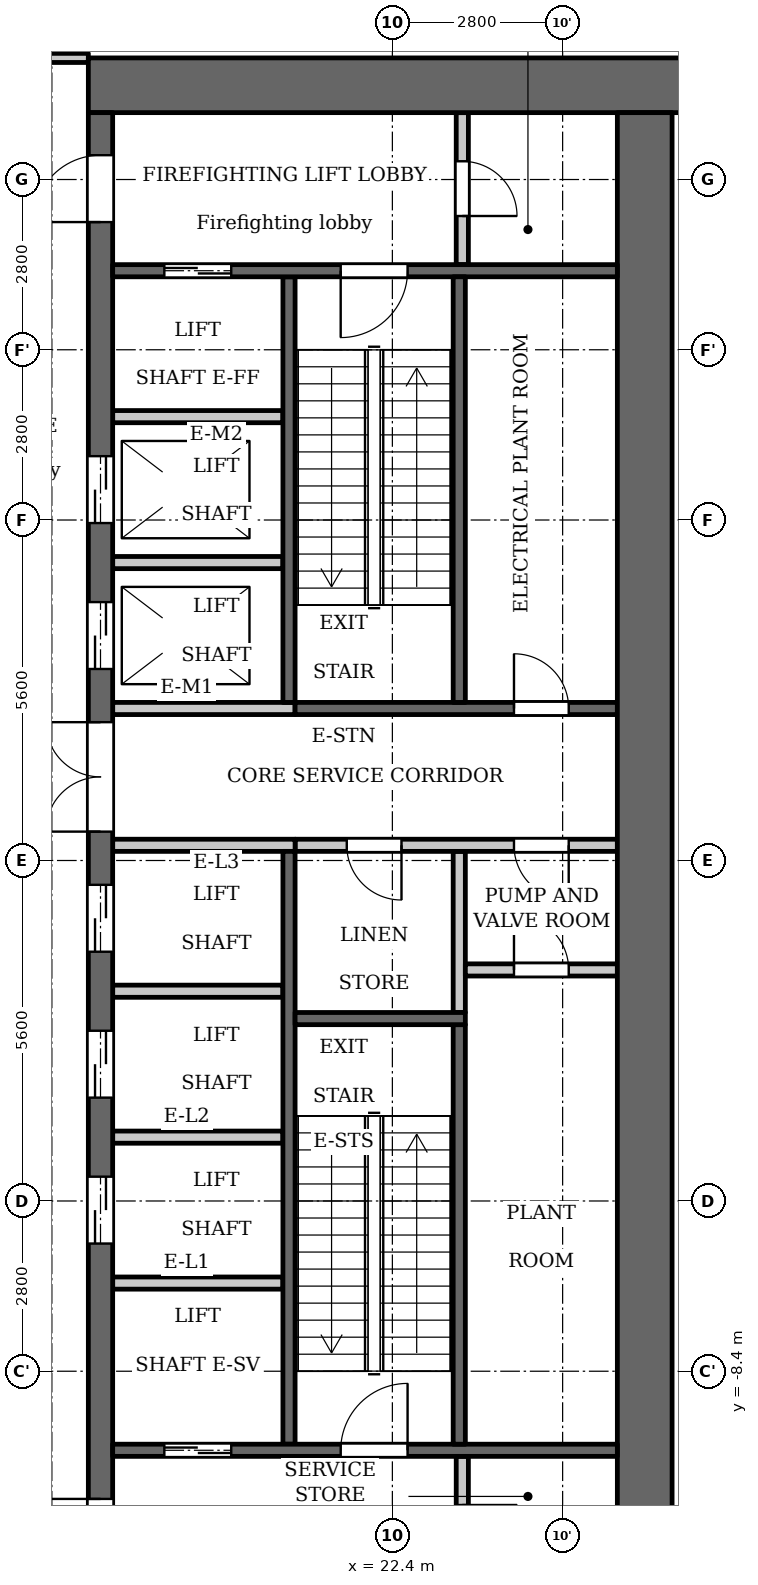
"""IFC4 building model, lengths in metres.
Left out: names, types, materials, properties, quantities, classifications, styles, units other than length and angle.
Written with IfcOpenShell. Run it as: python <this file> out.ifc"""

import sys

from ifc_helpers import new_model, si_unit, direction, frame, frame_2d, origin, place, context, subcontext, project, spatial, rectangle, extrude, element, fill, save


model = new_model("IFC4")
c1 = context("Model", 3, precision=1e-05, world=origin(), true_north=direction((0.0, 1.0)))
c2 = subcontext(c1, "Body", "Model", "MODEL_VIEW")
j1 = project(units=[si_unit("LENGTHUNIT", "METRE"), si_unit("PLANEANGLEUNIT", "RADIAN")], contexts=[c1])
p1 = place(None, origin())
s1 = spatial("IfcSite", under=j1, at=p1, CompositionType="ELEMENT")
p2 = place(p1, origin())
s2 = spatial("IfcBuilding", under=s1, at=p2, CompositionType="ELEMENT")
p3 = place(p2, frame((0.0, 0.0, 125.3)))
s3 = spatial("IfcBuildingStorey", under=s2, at=p3, CompositionType="ELEMENT", Elevation=125.3)
p4 = place(p3, frame((23.5, -2.5, 0.0), z_axis=(0.0, 0.0, 1.0), x_axis=(0.0, 1.0, 0.0)))
e1 = element("IfcWall", 1, at=p4, inside=s3, PredefinedType="PARTITIONING", context=c2, shape_type="SweptSolid", body=[
    extrude(rectangle(XDim=2.65, YDim=0.2, at=frame_2d((1.325, 0.0))), origin(), (0.0, 0.0, 1.0), 4.95),
])
p5 = place(p3, frame((20.7, 2.6, 0.0), z_axis=(0.0, 0.0, 1.0), x_axis=(0.0, 1.0, 0.0)))
e2 = element("IfcWall", 2, at=p5, inside=s3, PredefinedType="SHEAR", context=c2, shape_type="SweptSolid", body=[
    extrude(rectangle(XDim=7.0, YDim=0.2, at=frame_2d((3.5, 0.0))), origin(), (0.0, 0.0, 1.0), 4.95),
])
p6 = place(p3, frame((20.7, -9.6, 0.0), z_axis=(0.0, 0.0, 1.0), x_axis=(0.0, 1.0, 0.0)))
e3 = element("IfcWall", 3, at=p6, inside=s3, PredefinedType="SHEAR", context=c2, shape_type="SweptSolid", body=[
    extrude(rectangle(XDim=9.75, YDim=0.2, at=frame_2d((4.875, 0.0))), origin(), (0.0, 0.0, 1.0), 4.95),
])
p7 = place(p3, frame((20.8, 2.5, 0.0), z_axis=(0.0, 0.0, 1.0), x_axis=(1.0, 0.0, 0.0)))
e4 = element("IfcWall", 4, at=p7, inside=s3, PredefinedType="SHEAR", context=c2, shape_type="SweptSolid", body=[
    extrude(rectangle(XDim=5.3, YDim=0.2, at=frame_2d((2.65, 0.0))), origin(), (0.0, 0.0, 1.0), 4.95),
])
p8 = place(p7, frame((3.6, 0.0, 0.0)))
e5 = element("IfcOpeningElement", 5, at=p8, cuts=e4, PredefinedType="OPENING", context=c2, shape_type="SweptSolid", body=[
    extrude(rectangle(XDim=0.9, YDim=2.1, at=frame_2d((0.45, 1.05))), frame((0.0, 0.11, 0.0), z_axis=(0.0, -1.0, 0.0), x_axis=(1.0, 0.0, 0.0)), (0.0, 0.0, 1.0), 0.22),
])
p9 = place(p3, frame((20.8, 0.25, 0.0), z_axis=(0.0, 0.0, 1.0), x_axis=(1.0, 0.0, 0.0)))
e6 = element("IfcWall", 6, at=p9, inside=s3, PredefinedType="PARTITIONING", context=c2, shape_type="SweptSolid", body=[
    extrude(rectangle(XDim=5.3, YDim=0.2, at=frame_2d((2.65, 0.0))), origin(), (0.0, 0.0, 1.0), 4.95),
])
p10 = place(p9, frame((0.85, 0.0, 0.0)))
e7 = element("IfcOpeningElement", 7, at=p10, cuts=e6, PredefinedType="OPENING", context=c2, shape_type="SweptSolid", body=[
    extrude(rectangle(XDim=0.9, YDim=2.1, at=frame_2d((0.45, 1.05))), frame((0.0, 0.11, 0.0), z_axis=(0.0, -1.0, 0.0), x_axis=(1.0, 0.0, 0.0)), (0.0, 0.0, 1.0), 0.22),
])
p11 = place(p9, frame((3.6, 0.0, 0.0)))
e8 = element("IfcOpeningElement", 8, at=p11, cuts=e6, PredefinedType="OPENING", context=c2, shape_type="SweptSolid", body=[
    extrude(rectangle(XDim=0.9, YDim=2.1, at=frame_2d((0.45, 1.05))), frame((0.0, 0.11, 0.0), z_axis=(0.0, -1.0, 0.0), x_axis=(1.0, 0.0, 0.0)), (0.0, 0.0, 1.0), 0.22),
])
p12 = place(p3, frame((17.4, 12.75, 0.0), z_axis=(0.0, 0.0, 1.0), x_axis=(1.0, 0.0, 0.0)))
e9 = element("IfcWall", 9, at=p12, inside=s3, PredefinedType="SHEAR", context=c2, shape_type="SweptSolid", body=[
    extrude(rectangle(XDim=10.4, YDim=0.9, at=frame_2d((5.2, 0.0))), origin(), (0.0, 0.0, 1.0), 4.95),
])
p13 = place(p3, frame((17.6, -12.3, 0.0), z_axis=(0.0, 0.0, 1.0), x_axis=(0.0, 1.0, 0.0)))
e10 = element("IfcWall", 10, at=p13, inside=s3, PredefinedType="SHEAR", context=c2, shape_type="SweptSolid", body=[
    extrude(rectangle(XDim=24.6, YDim=0.4, at=frame_2d((12.3, 0.0))), origin(), (0.0, 0.0, 1.0), 4.95),
])
p14 = place(p13, frame((6.0, 0.0, 0.0)))
e11 = element("IfcOpeningElement", 11, at=p14, cuts=e10, PredefinedType="OPENING", context=c2, shape_type="SweptSolid", body=[
    extrude(rectangle(XDim=1.1, YDim=2.1, at=frame_2d((0.55, 1.05))), frame((0.0, 0.21, 0.0), z_axis=(0.0, -1.0, 0.0), x_axis=(1.0, 0.0, 0.0)), (0.0, 0.0, 1.0), 0.42),
])
p15 = place(p13, frame((8.4, 0.0, 0.0)))
e12 = element("IfcOpeningElement", 12, at=p15, cuts=e10, PredefinedType="OPENING", context=c2, shape_type="SweptSolid", body=[
    extrude(rectangle(XDim=1.1, YDim=2.1, at=frame_2d((0.55, 1.05))), frame((0.0, 0.21, 0.0), z_axis=(0.0, -1.0, 0.0), x_axis=(1.0, 0.0, 0.0)), (0.0, 0.0, 1.0), 0.42),
])
p16 = place(p13, frame((10.8, 0.0, 0.0)))
e13 = element("IfcOpeningElement", 13, at=p16, cuts=e10, PredefinedType="OPENING", context=c2, shape_type="SweptSolid", body=[
    extrude(rectangle(XDim=1.1, YDim=2.1, at=frame_2d((0.55, 1.05))), frame((0.0, 0.21, 0.0), z_axis=(0.0, -1.0, 0.0), x_axis=(1.0, 0.0, 0.0)), (0.0, 0.0, 1.0), 0.42),
])
p17 = place(p13, frame((15.45, 0.0, 0.0)))
e14 = element("IfcOpeningElement", 14, at=p17, cuts=e10, PredefinedType="OPENING", context=c2, shape_type="SweptSolid", body=[
    extrude(rectangle(XDim=1.1, YDim=2.1, at=frame_2d((0.55, 1.05))), frame((0.0, 0.21, 0.0), z_axis=(0.0, -1.0, 0.0), x_axis=(1.0, 0.0, 0.0)), (0.0, 0.0, 1.0), 0.42),
])
p18 = place(p13, frame((17.85, 0.0, 0.0)))
e15 = element("IfcOpeningElement", 15, at=p18, cuts=e10, PredefinedType="OPENING", context=c2, shape_type="SweptSolid", body=[
    extrude(rectangle(XDim=1.1, YDim=2.1, at=frame_2d((0.55, 1.05))), frame((0.0, 0.21, 0.0), z_axis=(0.0, -1.0, 0.0), x_axis=(1.0, 0.0, 0.0)), (0.0, 0.0, 1.0), 0.42),
])
p19 = place(p13, frame((22.8, 0.0, 0.0)))
e16 = element("IfcOpeningElement", 16, at=p19, cuts=e10, PredefinedType="OPENING", context=c2, shape_type="SweptSolid", body=[
    extrude(rectangle(XDim=1.1, YDim=2.1, at=frame_2d((0.55, 1.05))), frame((0.0, 0.21, 0.0), z_axis=(0.0, -1.0, 0.0), x_axis=(1.0, 0.0, 0.0)), (0.0, 0.0, 1.0), 0.42),
])
p20 = place(p13, frame((0.7, 0.0, 0.0)))
e17 = element("IfcOpeningElement", 17, at=p20, cuts=e10, PredefinedType="OPENING", context=c2, shape_type="SweptSolid", body=[
    extrude(rectangle(XDim=1.1, YDim=2.1, at=frame_2d((0.55, 1.05))), frame((0.0, 0.21, 0.0), z_axis=(0.0, -1.0, 0.0), x_axis=(1.0, 0.0, 0.0)), (0.0, 0.0, 1.0), 0.42),
])
p21 = place(p13, frame((12.775, 0.0, 0.0)))
e18 = element("IfcOpeningElement", 18, at=p21, cuts=e10, PredefinedType="OPENING", context=c2, shape_type="SweptSolid", body=[
    extrude(rectangle(XDim=1.8, YDim=2.1, at=frame_2d((0.9, 1.05))), frame((0.0, 0.21, 0.0), z_axis=(0.0, -1.0, 0.0), x_axis=(1.0, 0.0, 0.0)), (0.0, 0.0, 1.0), 0.42),
])
p22 = place(p3, frame((26.55, -12.3, 0.0), z_axis=(0.0, 0.0, 1.0), x_axis=(0.0, 1.0, 0.0)))
e19 = element("IfcWall", 19, at=p22, inside=s3, PredefinedType="SHEAR", context=c2, shape_type="SweptSolid", body=[
    extrude(rectangle(XDim=24.6, YDim=0.9, at=frame_2d((12.3, 0.0))), origin(), (0.0, 0.0, 1.0), 4.95),
])
p23 = place(p3, frame((23.55, 9.8, 0.0), z_axis=(0.0, 0.0, 1.0), x_axis=(0.0, 1.0, 0.0)))
e20 = element("IfcWall", 20, at=p23, inside=s3, PredefinedType="PARTITIONING", context=c2, shape_type="SweptSolid", body=[
    extrude(rectangle(XDim=2.5, YDim=0.2, at=frame_2d((1.25, 0.0))), origin(), (0.0, 0.0, 1.0), 4.95),
])
p24 = place(p23, frame((0.8, 0.0, 0.0)))
e21 = element("IfcOpeningElement", 21, at=p24, cuts=e20, PredefinedType="OPENING", context=c2, shape_type="SweptSolid", body=[
    extrude(rectangle(XDim=0.9, YDim=2.1, at=frame_2d((0.45, 1.05))), frame((0.0, 0.11, 0.0), z_axis=(0.0, -1.0, 0.0), x_axis=(1.0, 0.0, 0.0)), (0.0, 0.0, 1.0), 0.22),
])
p25 = place(p3, frame((23.55, -12.3, 0.0), z_axis=(0.0, 0.0, 1.0), x_axis=(0.0, 1.0, 0.0)))
e22 = element("IfcWall", 22, at=p25, inside=s3, PredefinedType="PARTITIONING", context=c2, shape_type="SweptSolid", body=[
    extrude(rectangle(XDim=2.5, YDim=0.2, at=frame_2d((1.25, 0.0))), origin(), (0.0, 0.0, 1.0), 4.95),
])
p26 = place(p25, frame((0.8, 0.0, 0.0)))
e23 = element("IfcOpeningElement", 23, at=p26, cuts=e22, PredefinedType="OPENING", context=c2, shape_type="SweptSolid", body=[
    extrude(rectangle(XDim=0.9, YDim=2.1, at=frame_2d((0.45, 1.05))), frame((0.0, 0.11, 0.0), z_axis=(0.0, -1.0, 0.0), x_axis=(1.0, 0.0, 0.0)), (0.0, 0.0, 1.0), 0.22),
])
p27 = place(p3, frame((23.6, -1.8, 0.0), z_axis=(0.0, 0.0, 1.0), x_axis=(1.0, 0.0, 0.0)))
e24 = element("IfcWall", 24, at=p27, inside=s3, PredefinedType="PARTITIONING", context=c2, shape_type="SweptSolid", body=[
    extrude(rectangle(XDim=2.5, YDim=0.2, at=frame_2d((1.25, 0.0))), origin(), (0.0, 0.0, 1.0), 4.95),
])
p28 = place(p27, frame((0.8, 0.0, 0.0)))
e25 = element("IfcOpeningElement", 25, at=p28, cuts=e24, PredefinedType="OPENING", context=c2, shape_type="SweptSolid", body=[
    extrude(rectangle(XDim=0.9, YDim=2.1, at=frame_2d((0.45, 1.05))), frame((0.0, 0.11, 0.0), z_axis=(0.0, -1.0, 0.0), x_axis=(1.0, 0.0, 0.0)), (0.0, 0.0, 1.0), 0.22),
])
p29 = place(p3, frame((17.8, -9.7, 0.0), z_axis=(0.0, 0.0, 1.0), x_axis=(1.0, 0.0, 0.0)))
e26 = element("IfcWall", 26, at=p29, inside=s3, PredefinedType="SHEAR", context=c2, shape_type="SweptSolid", body=[
    extrude(rectangle(XDim=8.3, YDim=0.2, at=frame_2d((4.15, 0.0))), origin(), (0.0, 0.0, 1.0), 4.95),
])
p30 = place(p29, frame((0.85, 0.0, 0.0)))
e27 = element("IfcOpeningElement", 27, at=p30, cuts=e26, PredefinedType="OPENING", context=c2, shape_type="SweptSolid", body=[
    extrude(rectangle(XDim=1.1, YDim=2.1, at=frame_2d((0.55, 1.05))), frame((0.0, 0.11, 0.0), z_axis=(0.0, -1.0, 0.0), x_axis=(1.0, 0.0, 0.0)), (0.0, 0.0, 1.0), 0.22),
])
p31 = place(p29, frame((3.75, 0.0, 0.0)))
e28 = element("IfcOpeningElement", 28, at=p31, cuts=e26, PredefinedType="OPENING", context=c2, shape_type="SweptSolid", body=[
    extrude(rectangle(XDim=1.1, YDim=2.1, at=frame_2d((0.55, 1.05))), frame((0.0, 0.11, 0.0), z_axis=(0.0, -1.0, 0.0), x_axis=(1.0, 0.0, 0.0)), (0.0, 0.0, 1.0), 0.22),
])
for number, where, z_axis, x_axis in (
    (29, (17.8, -6.95, 0.0), (0.0, 0.0, 1.0), (1.0, 0.0, 0.0)),
    (30, (17.8, -4.55, 0.0), (0.0, 0.0, 1.0), (1.0, 0.0, 0.0)),
    (31, (17.8, -2.15, 0.0), (0.0, 0.0, 1.0), (1.0, 0.0, 0.0)),
):
    element("IfcWall", number, at=place(p3, frame(where, z_axis=z_axis, x_axis=x_axis)), inside=s3, PredefinedType="PARTITIONING", context=c2, shape_type="SweptSolid", body=[
        extrude(rectangle(XDim=2.8, YDim=0.2, at=frame_2d((1.4, 0.0))), origin(), (0.0, 0.0, 1.0), 4.95),
    ])
for number, where, z_axis, x_axis in (
    (32, (17.8, 0.25, 0.0), (0.0, 0.0, 1.0), (1.0, 0.0, 0.0)),
    (33, (17.8, 2.5, 0.0), (0.0, 0.0, 1.0), (1.0, 0.0, 0.0)),
):
    element("IfcWall", number, at=place(p3, frame(where, z_axis=z_axis, x_axis=x_axis)), inside=s3, PredefinedType="PARTITIONING", context=c2, shape_type="SweptSolid", body=[
        extrude(rectangle(XDim=3.0, YDim=0.2, at=frame_2d((1.5, 0.0))), origin(), (0.0, 0.0, 1.0), 4.95),
    ])
for number, where, z_axis, x_axis in (
    (34, (17.8, 4.9, 0.0), (0.0, 0.0, 1.0), (1.0, 0.0, 0.0)),
    (35, (17.8, 7.3, 0.0), (0.0, 0.0, 1.0), (1.0, 0.0, 0.0)),
):
    element("IfcWall", number, at=place(p3, frame(where, z_axis=z_axis, x_axis=x_axis)), inside=s3, PredefinedType="PARTITIONING", context=c2, shape_type="SweptSolid", body=[
        extrude(rectangle(XDim=2.8, YDim=0.2, at=frame_2d((1.4, 0.0))), origin(), (0.0, 0.0, 1.0), 4.95),
    ])
p32 = place(p3, frame((17.8, 9.7, 0.0), z_axis=(0.0, 0.0, 1.0), x_axis=(1.0, 0.0, 0.0)))
e36 = element("IfcWall", 36, at=p32, inside=s3, PredefinedType="SHEAR", context=c2, shape_type="SweptSolid", body=[
    extrude(rectangle(XDim=8.3, YDim=0.2, at=frame_2d((4.15, 0.0))), origin(), (0.0, 0.0, 1.0), 4.95),
])
p33 = place(p32, frame((0.85, 0.0, 0.0)))
e37 = element("IfcOpeningElement", 37, at=p33, cuts=e36, PredefinedType="OPENING", context=c2, shape_type="SweptSolid", body=[
    extrude(rectangle(XDim=1.1, YDim=2.1, at=frame_2d((0.55, 1.05))), frame((0.0, 0.11, 0.0), z_axis=(0.0, -1.0, 0.0), x_axis=(1.0, 0.0, 0.0)), (0.0, 0.0, 1.0), 0.22),
])
p34 = place(p32, frame((3.75, 0.0, 0.0)))
e38 = element("IfcOpeningElement", 38, at=p34, cuts=e36, PredefinedType="OPENING", context=c2, shape_type="SweptSolid", body=[
    extrude(rectangle(XDim=1.1, YDim=2.1, at=frame_2d((0.55, 1.05))), frame((0.0, 0.11, 0.0), z_axis=(0.0, -1.0, 0.0), x_axis=(1.0, 0.0, 0.0)), (0.0, 0.0, 1.0), 0.22),
])
p35 = place(p3, frame((23.5, 2.6, 0.0), z_axis=(0.0, 0.0, 1.0), x_axis=(0.0, 1.0, 0.0)))
e39 = element("IfcWall", 39, at=p35, inside=s3, PredefinedType="SHEAR", context=c2, shape_type="SweptSolid", body=[
    extrude(rectangle(XDim=7.0, YDim=0.2, at=frame_2d((3.5, 0.0))), origin(), (0.0, 0.0, 1.0), 4.95),
])
p36 = place(p3, frame((23.5, -9.6, 0.0), z_axis=(0.0, 0.0, 1.0), x_axis=(0.0, 1.0, 0.0)))
e40 = element("IfcWall", 40, at=p36, inside=s3, PredefinedType="SHEAR", context=c2, shape_type="SweptSolid", body=[
    extrude(rectangle(XDim=6.9, YDim=0.2, at=frame_2d((3.45, 0.0))), origin(), (0.0, 0.0, 1.0), 4.95),
])
p37 = place(p3, frame((20.8, -2.6, 0.0), z_axis=(0.0, 0.0, 1.0), x_axis=(1.0, 0.0, 0.0)))
e41 = element("IfcWall", 41, at=p37, inside=s3, PredefinedType="SHEAR", context=c2, shape_type="SweptSolid", body=[
    extrude(rectangle(XDim=2.8, YDim=0.2, at=frame_2d((1.4, 0.0))), origin(), (0.0, 0.0, 1.0), 4.95),
])
p38 = place(p3, frame((11.384, 13.2, 0.0), z_axis=(0.0, 0.0, 1.0), x_axis=(1.0, 0.0, 0.0)))
e42 = element("IfcWall", 42, at=p38, inside=s3, PredefinedType="PARTITIONING", context=c2, shape_type="SweptSolid", body=[
    extrude(rectangle(XDim=6.016, YDim=0.15, at=frame_2d((3.008, 0.0))), origin(), (0.0, 0.0, 1.0), 4.95),
])
p39 = place(p38, frame((4.166, 0.0, 0.0)))
e43 = element("IfcOpeningElement", 43, at=p39, cuts=e42, PredefinedType="OPENING", context=c2, shape_type="SweptSolid", body=[
    extrude(rectangle(XDim=1.2, YDim=2.1, at=frame_2d((0.6, 1.05))), frame((0.0, 0.085, 0.0), z_axis=(0.0, -1.0, 0.0), x_axis=(1.0, 0.0, 0.0)), (0.0, 0.0, 1.0), 0.17),
])
p40 = place(p38, frame((2.056, 0.0, 0.0)))
e44 = element("IfcOpeningElement", 44, at=p40, cuts=e42, PredefinedType="OPENING", context=c2, shape_type="SweptSolid", body=[
    extrude(rectangle(XDim=1.0, YDim=2.1, at=frame_2d((0.5, 1.05))), frame((0.0, 0.085, 0.0), z_axis=(0.0, -1.0, 0.0), x_axis=(1.0, 0.0, 0.0)), (0.0, 0.0, 1.0), 0.17),
])
p41 = place(p30, origin())
e45 = element("IfcDoor", 45, at=p41, inside=s3, OperationType="DOUBLE_DOOR_SLIDING", PredefinedType="DOOR", context=c2, shape_type="SweptSolid", body=[
    extrude(rectangle(XDim=1.1, YDim=2.1, at=frame_2d((0.55, 1.05))), frame((0.0, 0.025, 0.0), z_axis=(0.0, -1.0, 0.0), x_axis=(1.0, 0.0, 0.0)), (0.0, 0.0, 1.0), 0.05),
])
fill(e27, e45)
p42 = place(p14, origin())
e46 = element("IfcDoor", 46, at=p42, inside=s3, OperationType="DOUBLE_DOOR_SLIDING", PredefinedType="DOOR", context=c2, shape_type="SweptSolid", body=[
    extrude(rectangle(XDim=1.1, YDim=2.1, at=frame_2d((0.55, 1.05))), frame((0.0, 0.025, 0.0), z_axis=(0.0, -1.0, 0.0), x_axis=(1.0, 0.0, 0.0)), (0.0, 0.0, 1.0), 0.05),
])
fill(e11, e46)
p43 = place(p15, origin())
e47 = element("IfcDoor", 47, at=p43, inside=s3, OperationType="DOUBLE_DOOR_SLIDING", PredefinedType="DOOR", context=c2, shape_type="SweptSolid", body=[
    extrude(rectangle(XDim=1.1, YDim=2.1, at=frame_2d((0.55, 1.05))), frame((0.0, 0.025, 0.0), z_axis=(0.0, -1.0, 0.0), x_axis=(1.0, 0.0, 0.0)), (0.0, 0.0, 1.0), 0.05),
])
fill(e12, e47)
p44 = place(p16, origin())
e48 = element("IfcDoor", 48, at=p44, inside=s3, OperationType="DOUBLE_DOOR_SLIDING", PredefinedType="DOOR", context=c2, shape_type="SweptSolid", body=[
    extrude(rectangle(XDim=1.1, YDim=2.1, at=frame_2d((0.55, 1.05))), frame((0.0, 0.025, 0.0), z_axis=(0.0, -1.0, 0.0), x_axis=(1.0, 0.0, 0.0)), (0.0, 0.0, 1.0), 0.05),
])
fill(e13, e48)
p45 = place(p17, origin())
e49 = element("IfcDoor", 49, at=p45, inside=s3, OperationType="DOUBLE_DOOR_SLIDING", PredefinedType="DOOR", context=c2, shape_type="SweptSolid", body=[
    extrude(rectangle(XDim=1.1, YDim=2.1, at=frame_2d((0.55, 1.05))), frame((0.0, 0.025, 0.0), z_axis=(0.0, -1.0, 0.0), x_axis=(1.0, 0.0, 0.0)), (0.0, 0.0, 1.0), 0.05),
])
fill(e14, e49)
p46 = place(p18, origin())
e50 = element("IfcDoor", 50, at=p46, inside=s3, OperationType="DOUBLE_DOOR_SLIDING", PredefinedType="DOOR", context=c2, shape_type="SweptSolid", body=[
    extrude(rectangle(XDim=1.1, YDim=2.1, at=frame_2d((0.55, 1.05))), frame((0.0, 0.025, 0.0), z_axis=(0.0, -1.0, 0.0), x_axis=(1.0, 0.0, 0.0)), (0.0, 0.0, 1.0), 0.05),
])
fill(e15, e50)
p47 = place(p33, origin())
e51 = element("IfcDoor", 51, at=p47, inside=s3, OperationType="DOUBLE_DOOR_SLIDING", PredefinedType="DOOR", context=c2, shape_type="SweptSolid", body=[
    extrude(rectangle(XDim=1.1, YDim=2.1, at=frame_2d((0.55, 1.05))), frame((0.0, 0.025, 0.0), z_axis=(0.0, -1.0, 0.0), x_axis=(1.0, 0.0, 0.0)), (0.0, 0.0, 1.0), 0.05),
])
fill(e37, e51)
p48 = place(p19, origin())
e52 = element("IfcDoor", 52, at=p48, inside=s3, OperationType="SINGLE_SWING_RIGHT", PredefinedType="DOOR", context=c2, shape_type="SweptSolid", body=[
    extrude(rectangle(XDim=1.1, YDim=2.1, at=frame_2d((0.55, 1.05))), frame((0.0, 0.025, 0.0), z_axis=(0.0, -1.0, 0.0), x_axis=(1.0, 0.0, 0.0)), (0.0, 0.0, 1.0), 0.05),
])
fill(e16, e52)
p49 = place(p20, origin())
e53 = element("IfcDoor", 53, at=p49, inside=s3, OperationType="SINGLE_SWING_LEFT", PredefinedType="DOOR", context=c2, shape_type="SweptSolid", body=[
    extrude(rectangle(XDim=1.1, YDim=2.1, at=frame_2d((0.55, 1.05))), frame((0.0, 0.025, 0.0), z_axis=(0.0, -1.0, 0.0), x_axis=(1.0, 0.0, 0.0)), (0.0, 0.0, 1.0), 0.05),
])
fill(e17, e53)
p50 = place(p24, origin())
e54 = element("IfcDoor", 54, at=p50, inside=s3, OperationType="SINGLE_SWING_LEFT", PredefinedType="DOOR", context=c2, shape_type="SweptSolid", body=[
    extrude(rectangle(XDim=0.9, YDim=2.1, at=frame_2d((0.45, 1.05))), frame((0.0, 0.025, 0.0), z_axis=(0.0, -1.0, 0.0), x_axis=(1.0, 0.0, 0.0)), (0.0, 0.0, 1.0), 0.05),
])
fill(e21, e54)
p51 = place(p34, origin())
e55 = element("IfcDoor", 55, at=p51, inside=s3, OperationType="SINGLE_SWING_LEFT", PredefinedType="DOOR", context=c2, shape_type="SweptSolid", body=[
    extrude(rectangle(XDim=1.1, YDim=2.1, at=frame_2d((0.55, 1.05))), frame((0.0, 0.025, 0.0), z_axis=(0.0, -1.0, 0.0), x_axis=(1.0, 0.0, 0.0)), (0.0, 0.0, 1.0), 0.05),
])
fill(e38, e55)
p52 = place(p31, origin())
e56 = element("IfcDoor", 56, at=p52, inside=s3, OperationType="SINGLE_SWING_LEFT", PredefinedType="DOOR", context=c2, shape_type="SweptSolid", body=[
    extrude(rectangle(XDim=1.1, YDim=2.1, at=frame_2d((0.55, 1.05))), frame((0.0, 0.025, 0.0), z_axis=(0.0, -1.0, 0.0), x_axis=(1.0, 0.0, 0.0)), (0.0, 0.0, 1.0), 0.05),
])
fill(e28, e56)
p53 = place(p21, origin())
e57 = element("IfcDoor", 57, at=p53, inside=s3, OperationType="DOUBLE_DOOR_SINGLE_SWING", PredefinedType="DOOR", context=c2, shape_type="SweptSolid", body=[
    extrude(rectangle(XDim=1.8, YDim=2.1, at=frame_2d((0.9, 1.05))), frame((0.0, 0.025, 0.0), z_axis=(0.0, -1.0, 0.0), x_axis=(1.0, 0.0, 0.0)), (0.0, 0.0, 1.0), 0.05),
])
fill(e18, e57)
p54 = place(p10, origin())
e58 = element("IfcDoor", 58, at=p54, inside=s3, OperationType="SINGLE_SWING_RIGHT", PredefinedType="DOOR", context=c2, shape_type="SweptSolid", body=[
    extrude(rectangle(XDim=0.9, YDim=2.1, at=frame_2d((0.45, 1.05))), frame((0.0, 0.025, 0.0), z_axis=(0.0, -1.0, 0.0), x_axis=(1.0, 0.0, 0.0)), (0.0, 0.0, 1.0), 0.05),
])
fill(e7, e58)
p55 = place(p28, origin())
e59 = element("IfcDoor", 59, at=p55, inside=s3, OperationType="SINGLE_SWING_RIGHT", PredefinedType="DOOR", context=c2, shape_type="SweptSolid", body=[
    extrude(rectangle(XDim=0.9, YDim=2.1, at=frame_2d((0.45, 1.05))), frame((0.0, 0.025, 0.0), z_axis=(0.0, -1.0, 0.0), x_axis=(1.0, 0.0, 0.0)), (0.0, 0.0, 1.0), 0.05),
])
fill(e25, e59)
p56 = place(p11, origin())
e60 = element("IfcDoor", 60, at=p56, inside=s3, OperationType="SINGLE_SWING_RIGHT", PredefinedType="DOOR", context=c2, shape_type="SweptSolid", body=[
    extrude(rectangle(XDim=0.9, YDim=2.1, at=frame_2d((0.45, 1.05))), frame((0.0, 0.025, 0.0), z_axis=(0.0, -1.0, 0.0), x_axis=(1.0, 0.0, 0.0)), (0.0, 0.0, 1.0), 0.05),
])
fill(e8, e60)
p57 = place(p8, origin())
e61 = element("IfcDoor", 61, at=p57, inside=s3, OperationType="SINGLE_SWING_RIGHT", PredefinedType="DOOR", context=c2, shape_type="SweptSolid", body=[
    extrude(rectangle(XDim=0.9, YDim=2.1, at=frame_2d((0.45, 1.05))), frame((0.0, 0.025, 0.0), z_axis=(0.0, -1.0, 0.0), x_axis=(1.0, 0.0, 0.0)), (0.0, 0.0, 1.0), 0.05),
])
fill(e5, e61)
save(model, sys.argv[1])
